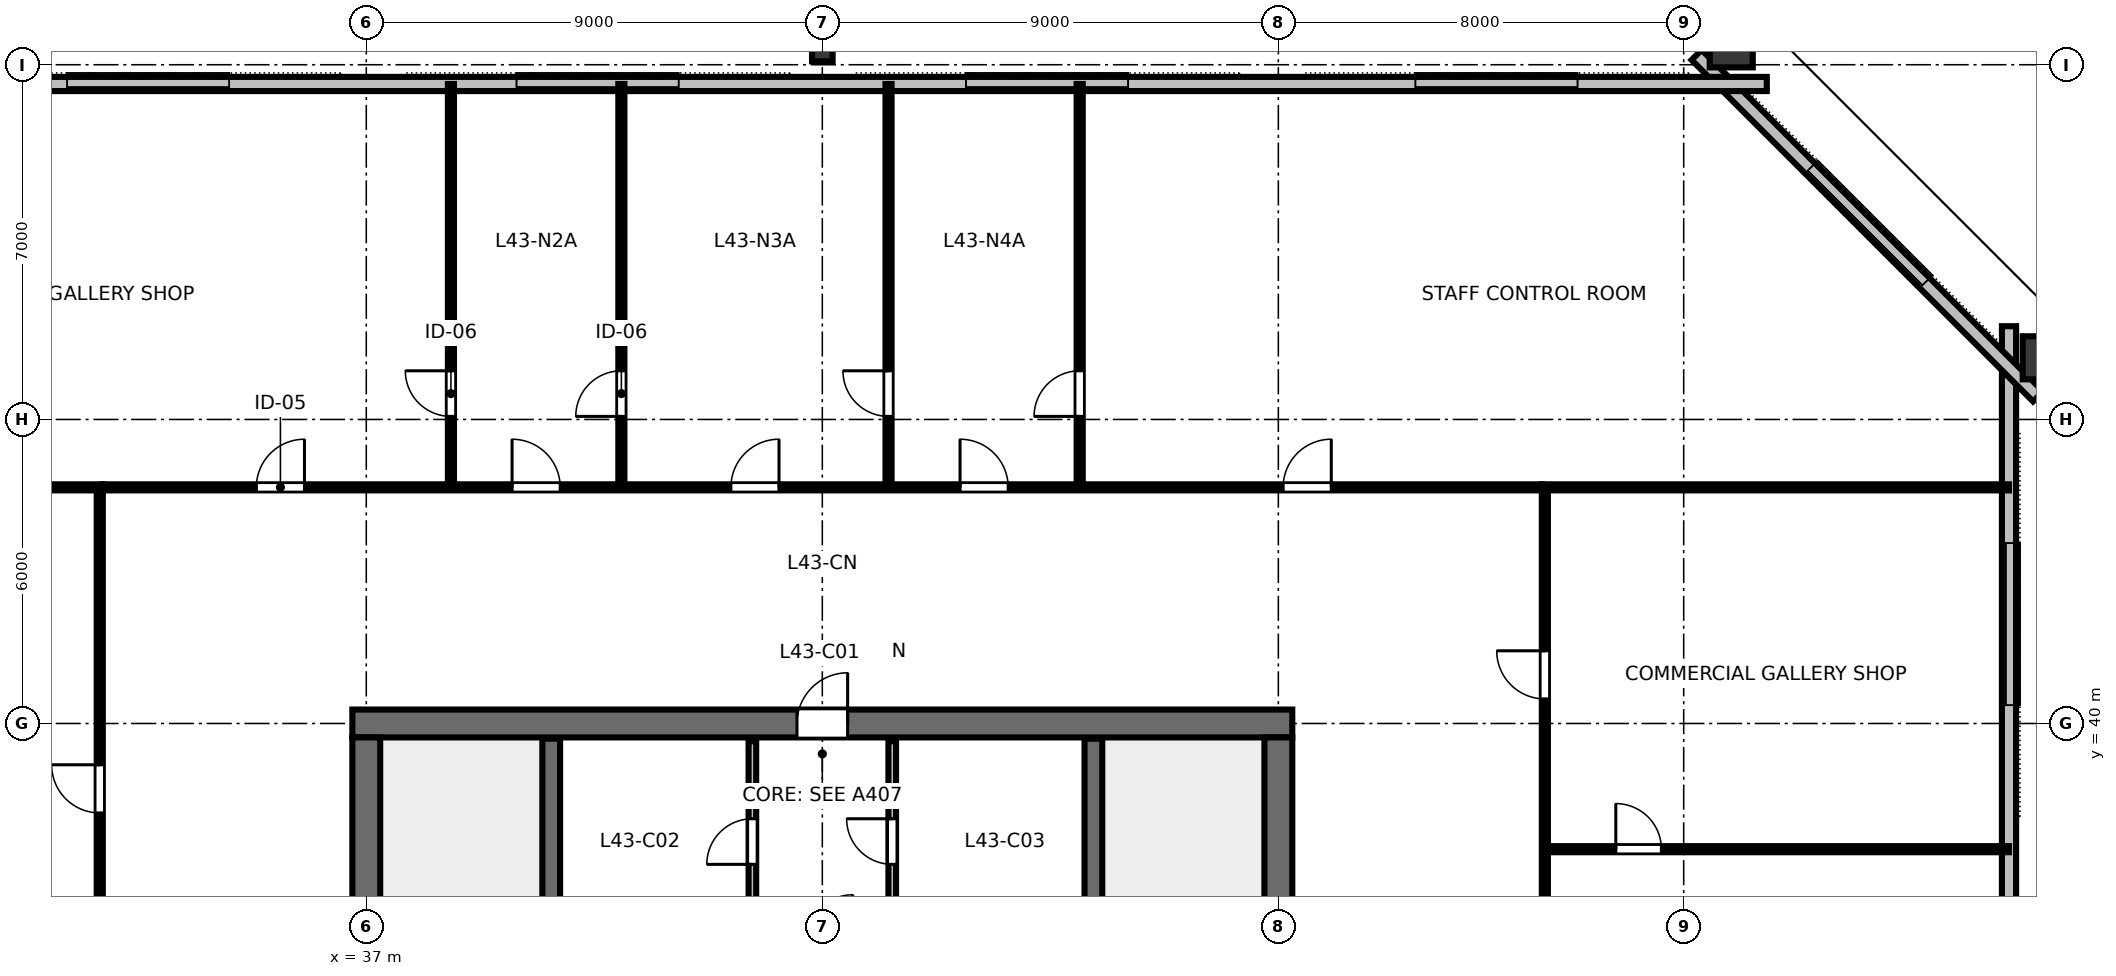
"""IFC4 building model, lengths in metres.
Left out: names, types, materials, properties, quantities, classifications, styles, units other than length and angle.
Written with IfcOpenShell. Run it as: python <this file> out.ifc"""

import sys

from ifc_helpers import new_model, si_unit, direction, frame, frame_2d, origin, origin_2d, place, context, subcontext, project, spatial, rectangle, hollow_rectangle, i_section, extrude, element, fill, save


model = new_model("IFC4")
c1 = context("Model", 3, precision=1e-05, world=origin(), true_north=direction((0.0, 1.0)))
c2 = subcontext(c1, "Body", "Model", "MODEL_VIEW")
j1 = project(units=[si_unit("LENGTHUNIT", "METRE"), si_unit("PLANEANGLEUNIT", "RADIAN")], contexts=[c1])
p1 = place(None, origin())
s1 = spatial("IfcSite", under=j1, at=p1, CompositionType="ELEMENT")
p2 = place(p1, origin())
s2 = spatial("IfcBuilding", under=s1, at=p2, CompositionType="ELEMENT")
p3 = place(p2, frame((0.0, 0.0, 163.6)))
s3 = spatial("IfcBuildingStorey", under=s2, at=p3, CompositionType="ELEMENT", Elevation=163.6)
p4 = place(p3, frame((36.725, 40.0, 0.0), z_axis=(0.0, 0.0, 1.0), x_axis=(1.0, 0.0, 0.0)))
e1 = element("IfcWall", 1, at=p4, inside=s3, PredefinedType="SHEAR", context=c2, shape_type="SweptSolid", body=[
    extrude(rectangle(XDim=18.55, YDim=0.55, at=frame_2d((9.275, 0.0))), origin(), (0.0, 0.0, 1.0), 3.28),
])
p5 = place(p4, frame((8.775, 0.0, 0.0)))
e2 = element("IfcOpeningElement", 2, at=p5, cuts=e1, PredefinedType="OPENING", context=c2, shape_type="SweptSolid", body=[
    extrude(rectangle(XDim=1.0, YDim=2.15, at=frame_2d((0.5, 1.075))), frame((0.0, 0.285, 0.0), z_axis=(0.0, -1.0, 0.0), x_axis=(1.0, 0.0, 0.0)), (0.0, 0.0, 1.0), 0.57),
])
p6 = place(p3, frame((37.0, 24.275, 0.0), z_axis=(0.0, 0.0, 1.0), x_axis=(0.0, 1.0, 0.0)))
e3 = element("IfcWall", 3, at=p6, inside=s3, PredefinedType="SHEAR", context=c2, shape_type="SweptSolid", body=[
    extrude(rectangle(XDim=15.45, YDim=0.55, at=frame_2d((7.725, 0.0))), origin(), (0.0, 0.0, 1.0), 3.28),
])
p7 = place(p6, frame((5.25, 0.0, 0.0)))
e4 = element("IfcOpeningElement", 4, at=p7, cuts=e3, PredefinedType="OPENING", context=c2, shape_type="SweptSolid", body=[
    extrude(rectangle(XDim=1.15, YDim=2.15, at=frame_2d((0.575, 1.075))), frame((0.0, 0.285, 0.0), z_axis=(0.0, -1.0, 0.0), x_axis=(1.0, 0.0, 0.0)), (0.0, 0.0, 1.0), 0.57),
])
p8 = place(p3, frame((55.0, 24.275, 0.0), z_axis=(0.0, 0.0, 1.0), x_axis=(0.0, 1.0, 0.0)))
e5 = element("IfcWall", 5, at=p8, inside=s3, PredefinedType="SHEAR", context=c2, shape_type="SweptSolid", body=[
    extrude(rectangle(XDim=15.45, YDim=0.55, at=frame_2d((7.725, 0.0))), origin(), (0.0, 0.0, 1.0), 3.28),
])
p9 = place(p8, frame((5.25, 0.0, 0.0)))
e6 = element("IfcOpeningElement", 6, at=p9, cuts=e5, PredefinedType="OPENING", context=c2, shape_type="SweptSolid", body=[
    extrude(rectangle(XDim=1.15, YDim=2.15, at=frame_2d((0.575, 1.075))), frame((0.0, 0.285, 0.0), z_axis=(0.0, -1.0, 0.0), x_axis=(1.0, 0.0, 0.0)), (0.0, 0.0, 1.0), 0.57),
])
p10 = place(p3, frame((70.19, 47.217, 0.0), z_axis=(-0.155392621081, -0.153720951163, 0.975819144354), x_axis=(0.693729718615, 0.686266770285, 0.218579499296)))
e7 = element("IfcColumn", 7, at=p10, inside=s3, PredefinedType="COLUMN", context=c2, shape_type="SweptSolid", body=[
    extrude(hollow_rectangle(XDim=0.85, YDim=1.0, WallThickness=0.05, at=origin_2d()), origin(), (0.0, 0.0, 1.0), 3.359),
])
p11 = place(p3, frame((63.938, 53.448, 0.0), z_axis=(-0.177459869766, -0.131769219711, 0.975266562207), x_axis=(0.596154567715, -0.802869685187, 0.0)))
e8 = element("IfcColumn", 8, at=p11, inside=s3, PredefinedType="COLUMN", context=c2, shape_type="SweptSolid", body=[
    extrude(hollow_rectangle(XDim=0.85, YDim=1.0, WallThickness=0.05, at=origin_2d()), origin(), (0.0, 0.0, 1.0), 3.361),
])
p12 = place(p3, frame((46.0, 53.28, 0.0), z_axis=(0.0, -0.133024371067, 0.991112766895), x_axis=(1.0, 0.0, 0.0)))
e9 = element("IfcColumn", 9, at=p12, inside=s3, PredefinedType="COLUMN", context=c2, shape_type="SweptSolid", body=[
    extrude(i_section(OverallWidth=0.406, OverallDepth=0.425, WebThickness=0.033, FlangeThickness=0.052, FilletRadius=0.025, at=origin_2d()), origin(), (0.0, 0.0, 1.0), 3.307),
])
p13 = place(p3, frame((69.42, 16.16, 0.0), z_axis=(0.0, 0.0, 1.0), x_axis=(0.0, 1.0, 0.0)))
e10 = element("IfcWall", 10, at=p13, inside=s3, PredefinedType="STANDARD", context=c2, shape_type="SweptSolid", body=[
    extrude(rectangle(XDim=31.68, YDim=0.28, at=frame_2d((15.84, 0.0))), origin(), (0.0, 0.0, 1.0), 2.151),
])
p14 = place(p3, frame((69.994, 46.455, 0.0), z_axis=(0.0, 0.0, 1.0), x_axis=(-0.707119588888, 0.707093973253, 0.0)))
e11 = element("IfcWall", 11, at=p14, inside=s3, PredefinedType="STANDARD", context=c2, shape_type="SweptSolid", body=[
    extrude(rectangle(XDim=9.531, YDim=0.28, at=frame_2d((4.766, 0.0))), origin(), (0.0, 0.0, 1.0), 2.343),
])
p15 = place(p3, frame((64.64, 52.62, 0.0), z_axis=(0.0, 0.0, 1.0), x_axis=(-1.0, 0.0, 0.0)))
e12 = element("IfcWall", 12, at=p15, inside=s3, PredefinedType="STANDARD", context=c2, shape_type="SweptSolid", body=[
    extrude(rectangle(XDim=37.28, YDim=0.28, at=frame_2d((18.64, 0.0))), origin(), (0.0, 0.0, 1.0), 2.343),
])
for number, where, z_axis, x_axis in (
    (13, (40.65, 32.0, 0.0), (0.0, 0.0, 1.0), (0.0, 1.0, 0.0)),
    (14, (51.35, 32.0, 0.0), (0.0, 0.0, 1.0), (0.0, 1.0, 0.0)),
):
    element("IfcWall", number, at=place(p3, frame(where, z_axis=z_axis, x_axis=x_axis)), inside=s3, PredefinedType="SHEAR", context=c2, shape_type="SweptSolid", body=[
        extrude(rectangle(XDim=7.7, YDim=0.35, at=frame_2d((3.85, 0.0))), origin(), (0.0, 0.0, 1.0), 3.6),
    ])
p16 = place(p3, frame((44.62, 35.72, 0.0), z_axis=(0.0, 0.0, 1.0), x_axis=(0.0, 1.0, 0.0)))
e15 = element("IfcWall", 15, at=p16, inside=s3, PredefinedType="PARTITIONING", context=c2, shape_type="SweptSolid", body=[
    extrude(rectangle(XDim=3.93, YDim=0.15, at=frame_2d((1.965, 0.0))), origin(), (0.0, 0.0, 1.0), 3.28),
])
p17 = place(p16, frame((1.5, 0.0, 0.0)))
e16 = element("IfcOpeningElement", 16, at=p17, cuts=e15, PredefinedType="OPENING", context=c2, shape_type="SweptSolid", body=[
    extrude(rectangle(XDim=0.9, YDim=2.15, at=frame_2d((0.45, 1.075))), frame((0.0, 0.085, 0.0), z_axis=(0.0, -1.0, 0.0), x_axis=(1.0, 0.0, 0.0)), (0.0, 0.0, 1.0), 0.17),
])
p18 = place(p3, frame((47.38, 35.72, 0.0), z_axis=(0.0, 0.0, 1.0), x_axis=(0.0, 1.0, 0.0)))
e17 = element("IfcWall", 17, at=p18, inside=s3, PredefinedType="PARTITIONING", context=c2, shape_type="SweptSolid", body=[
    extrude(rectangle(XDim=3.93, YDim=0.15, at=frame_2d((1.965, 0.0))), origin(), (0.0, 0.0, 1.0), 3.28),
])
p19 = place(p18, frame((1.5, 0.0, 0.0)))
e18 = element("IfcOpeningElement", 18, at=p19, cuts=e17, PredefinedType="OPENING", context=c2, shape_type="SweptSolid", body=[
    extrude(rectangle(XDim=0.9, YDim=2.15, at=frame_2d((0.45, 1.075))), frame((0.0, 0.085, 0.0), z_axis=(0.0, -1.0, 0.0), x_axis=(1.0, 0.0, 0.0)), (0.0, 0.0, 1.0), 0.17),
])
p20 = place(p3, frame((38.67, 44.66, 0.0), z_axis=(0.0, 0.0, 1.0), x_axis=(0.0, 1.0, 0.0)))
e19 = element("IfcWall", 19, at=p20, inside=s3, PredefinedType="PARTITIONING", context=c2, shape_type="SweptSolid", body=[
    extrude(rectangle(XDim=7.96, YDim=0.12, at=frame_2d((3.98, 0.0))), origin(), (0.0, 0.0, 1.0), 2.56),
])
p21 = place(p20, frame((1.4, 0.0, 0.0)))
e20 = element("IfcOpeningElement", 20, at=p21, cuts=e19, PredefinedType="OPENING", context=c2, shape_type="SweptSolid", body=[
    extrude(rectangle(XDim=0.9, YDim=2.15, at=frame_2d((0.45, 1.075))), frame((0.0, 0.07, 0.0), z_axis=(0.0, -1.0, 0.0), x_axis=(1.0, 0.0, 0.0)), (0.0, 0.0, 1.0), 0.14),
])
p22 = place(p3, frame((42.034, 44.66, 0.0), z_axis=(0.0, 0.0, 1.0), x_axis=(0.0, 1.0, 0.0)))
e21 = element("IfcWall", 21, at=p22, inside=s3, PredefinedType="PARTITIONING", context=c2, shape_type="SweptSolid", body=[
    extrude(rectangle(XDim=7.96, YDim=0.12, at=frame_2d((3.98, 0.0))), origin(), (0.0, 0.0, 1.0), 2.56),
])
p23 = place(p22, frame((1.4, 0.0, 0.0)))
e22 = element("IfcOpeningElement", 22, at=p23, cuts=e21, PredefinedType="OPENING", context=c2, shape_type="SweptSolid", body=[
    extrude(rectangle(XDim=0.9, YDim=2.15, at=frame_2d((0.45, 1.075))), frame((0.0, 0.07, 0.0), z_axis=(0.0, -1.0, 0.0), x_axis=(1.0, 0.0, 0.0)), (0.0, 0.0, 1.0), 0.14),
])
p24 = place(p3, frame((47.307, 44.66, 0.0), z_axis=(0.0, 0.0, 1.0), x_axis=(0.0, 1.0, 0.0)))
e23 = element("IfcWall", 23, at=p24, inside=s3, PredefinedType="PARTITIONING", context=c2, shape_type="SweptSolid", body=[
    extrude(rectangle(XDim=7.96, YDim=0.12, at=frame_2d((3.98, 0.0))), origin(), (0.0, 0.0, 1.0), 2.56),
])
p25 = place(p24, frame((1.4, 0.0, 0.0)))
e24 = element("IfcOpeningElement", 24, at=p25, cuts=e23, PredefinedType="OPENING", context=c2, shape_type="SweptSolid", body=[
    extrude(rectangle(XDim=0.9, YDim=2.15, at=frame_2d((0.45, 1.075))), frame((0.0, 0.07, 0.0), z_axis=(0.0, -1.0, 0.0), x_axis=(1.0, 0.0, 0.0)), (0.0, 0.0, 1.0), 0.14),
])
p26 = place(p3, frame((51.08, 44.66, 0.0), z_axis=(0.0, 0.0, 1.0), x_axis=(0.0, 1.0, 0.0)))
e25 = element("IfcWall", 25, at=p26, inside=s3, PredefinedType="PARTITIONING", context=c2, shape_type="SweptSolid", body=[
    extrude(rectangle(XDim=7.96, YDim=0.12, at=frame_2d((3.98, 0.0))), origin(), (0.0, 0.0, 1.0), 2.56),
])
p27 = place(p26, frame((1.4, 0.0, 0.0)))
e26 = element("IfcOpeningElement", 26, at=p27, cuts=e25, PredefinedType="OPENING", context=c2, shape_type="SweptSolid", body=[
    extrude(rectangle(XDim=0.9, YDim=2.15, at=frame_2d((0.45, 1.075))), frame((0.0, 0.07, 0.0), z_axis=(0.0, -1.0, 0.0), x_axis=(1.0, 0.0, 0.0)), (0.0, 0.0, 1.0), 0.14),
])
p28 = place(p3, frame((31.8, 44.66, 0.0), z_axis=(0.0, 0.0, 1.0), x_axis=(1.0, 0.0, 0.0)))
e27 = element("IfcWall", 27, at=p28, inside=s3, PredefinedType="PARTITIONING", context=c2, shape_type="SweptSolid", body=[
    extrude(rectangle(XDim=28.4, YDim=0.12, at=frame_2d((14.2, 0.0))), origin(), (0.0, 0.0, 1.0), 2.56),
])
p29 = place(p28, frame((3.03, 0.0, 0.0)))
e28 = element("IfcOpeningElement", 28, at=p29, cuts=e27, PredefinedType="OPENING", context=c2, shape_type="SweptSolid", body=[
    extrude(rectangle(XDim=0.95, YDim=2.15, at=frame_2d((0.475, 1.075))), frame((0.0, 0.07, 0.0), z_axis=(0.0, -1.0, 0.0), x_axis=(1.0, 0.0, 0.0)), (0.0, 0.0, 1.0), 0.14),
])
p30 = place(p28, frame((8.077, 0.0, 0.0)))
e29 = element("IfcOpeningElement", 29, at=p30, cuts=e27, PredefinedType="OPENING", context=c2, shape_type="SweptSolid", body=[
    extrude(rectangle(XDim=0.95, YDim=2.15, at=frame_2d((0.475, 1.075))), frame((0.0, 0.07, 0.0), z_axis=(0.0, -1.0, 0.0), x_axis=(1.0, 0.0, 0.0)), (0.0, 0.0, 1.0), 0.14),
])
p31 = place(p28, frame((12.396, 0.0, 0.0)))
e30 = element("IfcOpeningElement", 30, at=p31, cuts=e27, PredefinedType="OPENING", context=c2, shape_type="SweptSolid", body=[
    extrude(rectangle(XDim=0.95, YDim=2.15, at=frame_2d((0.475, 1.075))), frame((0.0, 0.07, 0.0), z_axis=(0.0, -1.0, 0.0), x_axis=(1.0, 0.0, 0.0)), (0.0, 0.0, 1.0), 0.14),
])
p32 = place(p28, frame((16.918, 0.0, 0.0)))
e31 = element("IfcOpeningElement", 31, at=p32, cuts=e27, PredefinedType="OPENING", context=c2, shape_type="SweptSolid", body=[
    extrude(rectangle(XDim=0.95, YDim=2.15, at=frame_2d((0.475, 1.075))), frame((0.0, 0.07, 0.0), z_axis=(0.0, -1.0, 0.0), x_axis=(1.0, 0.0, 0.0)), (0.0, 0.0, 1.0), 0.14),
])
p33 = place(p28, frame((23.295, 0.0, 0.0)))
e32 = element("IfcOpeningElement", 32, at=p33, cuts=e27, PredefinedType="OPENING", context=c2, shape_type="SweptSolid", body=[
    extrude(rectangle(XDim=0.95, YDim=2.15, at=frame_2d((0.475, 1.075))), frame((0.0, 0.07, 0.0), z_axis=(0.0, -1.0, 0.0), x_axis=(1.0, 0.0, 0.0)), (0.0, 0.0, 1.0), 0.14),
])
p34 = place(p3, frame((31.74, 33.02, 0.0), z_axis=(0.0, 0.0, 1.0), x_axis=(0.0, 1.0, 0.0)))
e33 = element("IfcWall", 33, at=p34, inside=s3, PredefinedType="PARTITIONING", context=c2, shape_type="SweptSolid", body=[
    extrude(rectangle(XDim=11.58, YDim=0.12, at=frame_2d((5.79, 0.0))), origin(), (0.0, 0.0, 1.0), 2.56),
])
p35 = place(p34, frame((5.215, 0.0, 0.0)))
e34 = element("IfcOpeningElement", 34, at=p35, cuts=e33, PredefinedType="OPENING", context=c2, shape_type="SweptSolid", body=[
    extrude(rectangle(XDim=0.95, YDim=2.15, at=frame_2d((0.475, 1.075))), frame((0.0, 0.07, 0.0), z_axis=(0.0, -1.0, 0.0), x_axis=(1.0, 0.0, 0.0)), (0.0, 0.0, 1.0), 0.14),
])
p36 = place(p3, frame((60.26, 37.519, 0.0), z_axis=(0.0, 0.0, 1.0), x_axis=(1.0, 0.0, 0.0)))
e35 = element("IfcWall", 35, at=p36, inside=s3, PredefinedType="PARTITIONING", context=c2, shape_type="SweptSolid", body=[
    extrude(rectangle(XDim=9.16, YDim=0.12, at=frame_2d((4.58, 0.0))), origin(), (0.0, 0.0, 1.0), 2.56),
])
p37 = place(p36, frame((1.4, 0.0, 0.0)))
e36 = element("IfcOpeningElement", 36, at=p37, cuts=e35, PredefinedType="OPENING", context=c2, shape_type="SweptSolid", body=[
    extrude(rectangle(XDim=0.9, YDim=2.15, at=frame_2d((0.45, 1.075))), frame((0.0, 0.07, 0.0), z_axis=(0.0, -1.0, 0.0), x_axis=(1.0, 0.0, 0.0)), (0.0, 0.0, 1.0), 0.14),
])
p38 = place(p3, frame((60.26, 33.02, 0.0), z_axis=(0.0, 0.0, 1.0), x_axis=(0.0, 1.0, 0.0)))
e37 = element("IfcWall", 37, at=p38, inside=s3, PredefinedType="PARTITIONING", context=c2, shape_type="SweptSolid", body=[
    extrude(rectangle(XDim=11.58, YDim=0.12, at=frame_2d((5.79, 0.0))), origin(), (0.0, 0.0, 1.0), 2.56),
])
p39 = place(p38, frame((1.775, 0.0, 0.0)))
e38 = element("IfcOpeningElement", 38, at=p39, cuts=e37, PredefinedType="OPENING", context=c2, shape_type="SweptSolid", body=[
    extrude(rectangle(XDim=0.95, YDim=2.15, at=frame_2d((0.475, 1.075))), frame((0.0, 0.07, 0.0), z_axis=(0.0, -1.0, 0.0), x_axis=(1.0, 0.0, 0.0)), (0.0, 0.0, 1.0), 0.14),
])
p40 = place(p38, frame((7.465, 0.0, 0.0)))
e39 = element("IfcOpeningElement", 39, at=p40, cuts=e37, PredefinedType="OPENING", context=c2, shape_type="SweptSolid", body=[
    extrude(rectangle(XDim=0.95, YDim=2.15, at=frame_2d((0.475, 1.075))), frame((0.0, 0.07, 0.0), z_axis=(0.0, -1.0, 0.0), x_axis=(1.0, 0.0, 0.0)), (0.0, 0.0, 1.0), 0.14),
])
for number, where, z_axis, x_axis in (
    (40, (31.8, 44.66, 0.0), (0.0, 0.0, 1.0), (-1.0, 0.0, 0.0)),
    (41, (60.2, 44.66, 0.0), (0.0, 0.0, 1.0), (1.0, 0.0, 0.0)),
):
    element("IfcWall", number, at=place(p3, frame(where, z_axis=z_axis, x_axis=x_axis)), inside=s3, PredefinedType="PARTITIONING", context=c2, shape_type="SweptSolid", body=[
        extrude(rectangle(XDim=9.22, YDim=0.12, at=frame_2d((4.61, 0.0))), origin(), (0.0, 0.0, 1.0), 2.56),
    ])
p41 = place(p5, origin())
e42 = element("IfcDoor", 42, at=p41, inside=s3, OperationType="SINGLE_SWING_RIGHT", PredefinedType="DOOR", context=c2, shape_type="SweptSolid", body=[
    extrude(rectangle(XDim=1.0, YDim=2.15, at=frame_2d((0.5, 1.075))), frame((0.0, 0.025, 0.0), z_axis=(0.0, -1.0, 0.0), x_axis=(1.0, 0.0, 0.0)), (0.0, 0.0, 1.0), 0.05),
])
fill(e2, e42)
p42 = place(p17, origin())
e43 = element("IfcDoor", 43, at=p42, inside=s3, OperationType="SINGLE_SWING_LEFT", PredefinedType="DOOR", context=c2, shape_type="SweptSolid", body=[
    extrude(rectangle(XDim=0.9, YDim=2.15, at=frame_2d((0.45, 1.075))), frame((0.0, 0.025, 0.0), z_axis=(0.0, -1.0, 0.0), x_axis=(1.0, 0.0, 0.0)), (0.0, 0.0, 1.0), 0.05),
])
fill(e16, e43)
p43 = place(p19, origin())
e44 = element("IfcDoor", 44, at=p43, inside=s3, OperationType="SINGLE_SWING_RIGHT", PredefinedType="DOOR", context=c2, shape_type="SweptSolid", body=[
    extrude(rectangle(XDim=0.9, YDim=2.15, at=frame_2d((0.45, 1.075))), frame((0.0, 0.025, 0.0), z_axis=(0.0, -1.0, 0.0), x_axis=(1.0, 0.0, 0.0)), (0.0, 0.0, 1.0), 0.05),
])
fill(e18, e44)
p44 = place(p21, origin())
e45 = element("IfcDoor", 45, at=p44, inside=s3, OperationType="SINGLE_SWING_RIGHT", PredefinedType="DOOR", context=c2, shape_type="SweptSolid", body=[
    extrude(rectangle(XDim=0.9, YDim=2.15, at=frame_2d((0.45, 1.075))), frame((0.0, 0.025, 0.0), z_axis=(0.0, -1.0, 0.0), x_axis=(1.0, 0.0, 0.0)), (0.0, 0.0, 1.0), 0.05),
])
fill(e20, e45)
p45 = place(p23, origin())
e46 = element("IfcDoor", 46, at=p45, inside=s3, OperationType="SINGLE_SWING_LEFT", PredefinedType="DOOR", context=c2, shape_type="SweptSolid", body=[
    extrude(rectangle(XDim=0.9, YDim=2.15, at=frame_2d((0.45, 1.075))), frame((0.0, 0.025, 0.0), z_axis=(0.0, -1.0, 0.0), x_axis=(1.0, 0.0, 0.0)), (0.0, 0.0, 1.0), 0.05),
])
fill(e22, e46)
p46 = place(p25, origin())
e47 = element("IfcDoor", 47, at=p46, inside=s3, OperationType="SINGLE_SWING_RIGHT", PredefinedType="DOOR", context=c2, shape_type="SweptSolid", body=[
    extrude(rectangle(XDim=0.9, YDim=2.15, at=frame_2d((0.45, 1.075))), frame((0.0, 0.025, 0.0), z_axis=(0.0, -1.0, 0.0), x_axis=(1.0, 0.0, 0.0)), (0.0, 0.0, 1.0), 0.05),
])
fill(e24, e47)
p47 = place(p27, origin())
e48 = element("IfcDoor", 48, at=p47, inside=s3, OperationType="SINGLE_SWING_LEFT", PredefinedType="DOOR", context=c2, shape_type="SweptSolid", body=[
    extrude(rectangle(XDim=0.9, YDim=2.15, at=frame_2d((0.45, 1.075))), frame((0.0, 0.025, 0.0), z_axis=(0.0, -1.0, 0.0), x_axis=(1.0, 0.0, 0.0)), (0.0, 0.0, 1.0), 0.05),
])
fill(e26, e48)
p48 = place(p29, origin())
e49 = element("IfcDoor", 49, at=p48, inside=s3, OperationType="SINGLE_SWING_RIGHT", PredefinedType="DOOR", context=c2, shape_type="SweptSolid", body=[
    extrude(rectangle(XDim=0.95, YDim=2.15, at=frame_2d((0.475, 1.075))), frame((0.0, 0.025, 0.0), z_axis=(0.0, -1.0, 0.0), x_axis=(1.0, 0.0, 0.0)), (0.0, 0.0, 1.0), 0.05),
])
fill(e28, e49)
p49 = place(p30, origin())
e50 = element("IfcDoor", 50, at=p49, inside=s3, OperationType="SINGLE_SWING_LEFT", PredefinedType="DOOR", context=c2, shape_type="SweptSolid", body=[
    extrude(rectangle(XDim=0.95, YDim=2.15, at=frame_2d((0.475, 1.075))), frame((0.0, 0.025, 0.0), z_axis=(0.0, -1.0, 0.0), x_axis=(1.0, 0.0, 0.0)), (0.0, 0.0, 1.0), 0.05),
])
fill(e29, e50)
p50 = place(p31, origin())
e51 = element("IfcDoor", 51, at=p50, inside=s3, OperationType="SINGLE_SWING_RIGHT", PredefinedType="DOOR", context=c2, shape_type="SweptSolid", body=[
    extrude(rectangle(XDim=0.95, YDim=2.15, at=frame_2d((0.475, 1.075))), frame((0.0, 0.025, 0.0), z_axis=(0.0, -1.0, 0.0), x_axis=(1.0, 0.0, 0.0)), (0.0, 0.0, 1.0), 0.05),
])
fill(e30, e51)
p51 = place(p32, origin())
e52 = element("IfcDoor", 52, at=p51, inside=s3, OperationType="SINGLE_SWING_LEFT", PredefinedType="DOOR", context=c2, shape_type="SweptSolid", body=[
    extrude(rectangle(XDim=0.95, YDim=2.15, at=frame_2d((0.475, 1.075))), frame((0.0, 0.025, 0.0), z_axis=(0.0, -1.0, 0.0), x_axis=(1.0, 0.0, 0.0)), (0.0, 0.0, 1.0), 0.05),
])
fill(e31, e52)
p52 = place(p33, origin())
e53 = element("IfcDoor", 53, at=p52, inside=s3, OperationType="SINGLE_SWING_RIGHT", PredefinedType="DOOR", context=c2, shape_type="SweptSolid", body=[
    extrude(rectangle(XDim=0.95, YDim=2.15, at=frame_2d((0.475, 1.075))), frame((0.0, 0.025, 0.0), z_axis=(0.0, -1.0, 0.0), x_axis=(1.0, 0.0, 0.0)), (0.0, 0.0, 1.0), 0.05),
])
fill(e32, e53)
p53 = place(p35, origin())
e54 = element("IfcDoor", 54, at=p53, inside=s3, OperationType="SINGLE_SWING_RIGHT", PredefinedType="DOOR", context=c2, shape_type="SweptSolid", body=[
    extrude(rectangle(XDim=0.95, YDim=2.15, at=frame_2d((0.475, 1.075))), frame((0.0, 0.025, 0.0), z_axis=(0.0, -1.0, 0.0), x_axis=(1.0, 0.0, 0.0)), (0.0, 0.0, 1.0), 0.05),
])
fill(e34, e54)
p54 = place(p37, origin())
e55 = element("IfcDoor", 55, at=p54, inside=s3, OperationType="SINGLE_SWING_LEFT", PredefinedType="DOOR", context=c2, shape_type="SweptSolid", body=[
    extrude(rectangle(XDim=0.9, YDim=2.15, at=frame_2d((0.45, 1.075))), frame((0.0, 0.025, 0.0), z_axis=(0.0, -1.0, 0.0), x_axis=(1.0, 0.0, 0.0)), (0.0, 0.0, 1.0), 0.05),
])
fill(e36, e55)
p55 = place(p40, origin())
e56 = element("IfcDoor", 56, at=p55, inside=s3, OperationType="SINGLE_SWING_RIGHT", PredefinedType="DOOR", context=c2, shape_type="SweptSolid", body=[
    extrude(rectangle(XDim=0.95, YDim=2.15, at=frame_2d((0.475, 1.075))), frame((0.0, 0.025, 0.0), z_axis=(0.0, -1.0, 0.0), x_axis=(1.0, 0.0, 0.0)), (0.0, 0.0, 1.0), 0.05),
])
fill(e39, e56)
save(model, sys.argv[1])
